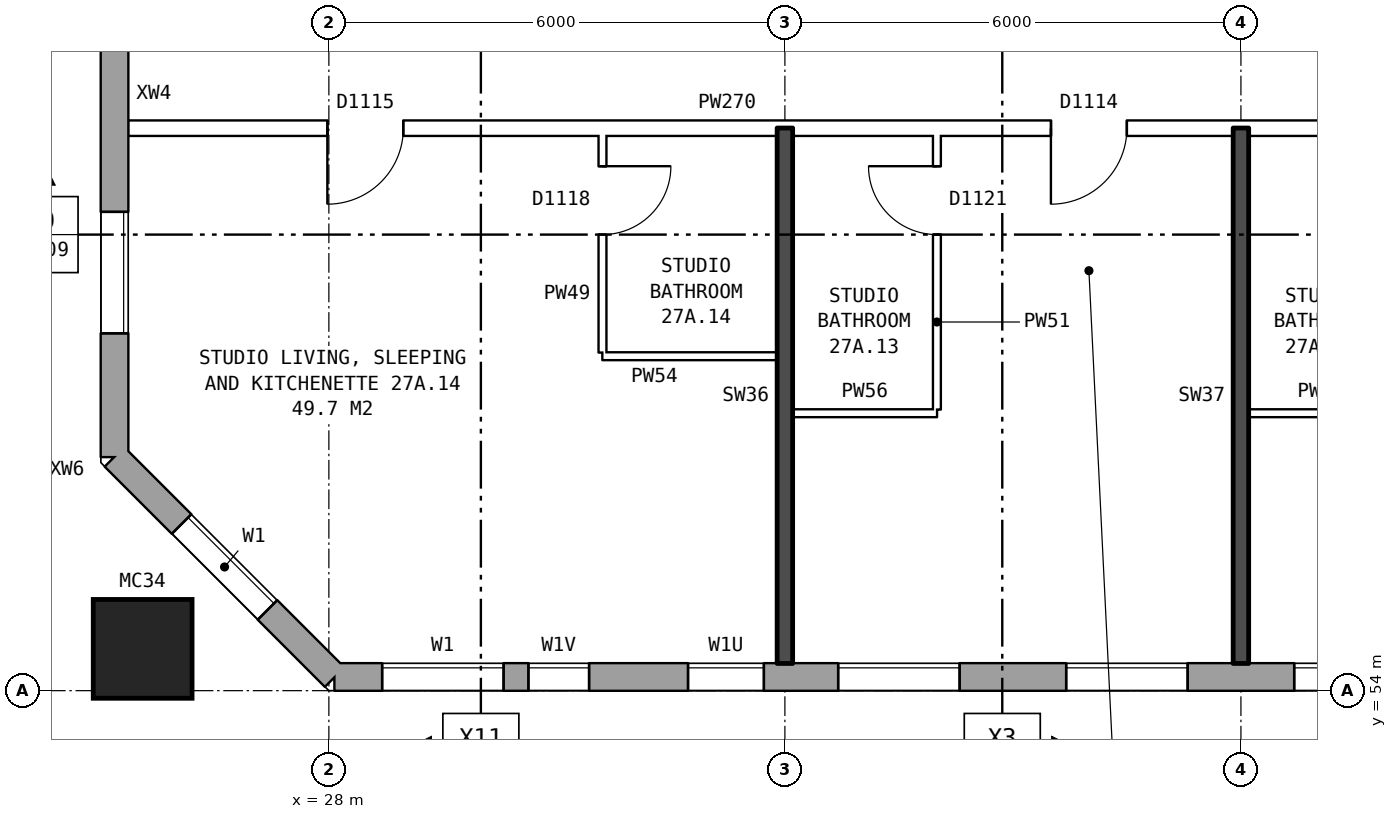
"""IFC4 building model, lengths in metres.
Left out: names, types, materials, properties, quantities, classifications, styles, units other than length and angle.
Written with IfcOpenShell. Run it as: python <this file> out.ifc"""

import sys

from ifc_helpers import new_model, si_unit, direction, frame, frame_2d, origin, origin_2d, place, context, subcontext, project, spatial, rectangle, hollow_rectangle, extrude, element, fill, save


model = new_model("IFC4")
c1 = context("Model", 3, precision=1e-05, world=origin(), true_north=direction((0.0, 1.0)))
c2 = subcontext(c1, "Body", "Model", "MODEL_VIEW")
j1 = project(units=[si_unit("LENGTHUNIT", "METRE"), si_unit("PLANEANGLEUNIT", "RADIAN")], contexts=[c1])
p1 = place(None, origin())
s1 = spatial("IfcSite", under=j1, at=p1, CompositionType="ELEMENT")
p2 = place(p1, origin())
s2 = spatial("IfcBuilding", under=s1, at=p2, CompositionType="ELEMENT")
p3 = place(p2, frame((0.0, 0.0, 99.5)))
s3 = spatial("IfcBuildingStorey", under=s2, at=p3, CompositionType="ELEMENT", Elevation=99.5)
p4 = place(p3, frame((25.55, 54.55, 0.0), z_axis=(0.0, 0.0, 1.0), x_axis=(1.0, 0.0, 0.0)))
e1 = element("IfcColumn", 1, at=p4, inside=s3, PredefinedType="COLUMN", context=c2, shape_type="SweptSolid", body=[
    extrude(hollow_rectangle(XDim=1.3, YDim=1.3, WallThickness=0.07, at=origin_2d()), origin(), (0.0, 0.0, 1.0), 3.1),
])
p5 = place(p3, frame((25.18, 57.075, 0.0), z_axis=(0.0, 0.0, 1.0), x_axis=(0.707106781187, -0.707106781187, 0.0)))
e2 = element("IfcWall", 2, at=p5, inside=s3, PredefinedType="STANDARD", context=c2, shape_type="SweptSolid", body=[
    extrude(rectangle(XDim=4.094, YDim=0.36, at=frame_2d((2.047, 0.0))), origin(), (0.0, 0.0, 1.0), 2.85),
])
p6 = place(p5, frame((1.247, 0.0, 0.8)))
e3 = element("IfcOpeningElement", 3, at=p6, cuts=e2, PredefinedType="OPENING", context=c2, shape_type="SweptSolid", body=[
    extrude(rectangle(XDim=1.6, YDim=1.8, at=frame_2d((0.8, 0.9))), frame((0.0, 0.19, 0.0), z_axis=(0.0, -1.0, 0.0), x_axis=(1.0, 0.0, 0.0)), (0.0, 0.0, 1.0), 0.38),
])
p7 = place(p3, frame((28.075, 54.18, 0.0), z_axis=(0.0, 0.0, 1.0), x_axis=(1.0, 0.0, 0.0)))
e4 = element("IfcWall", 4, at=p7, inside=s3, PredefinedType="STANDARD", context=c2, shape_type="SweptSolid", body=[
    extrude(rectangle(XDim=44.851, YDim=0.36, at=frame_2d((22.425, 0.0))), origin(), (0.0, 0.0, 1.0), 2.85),
])
p8 = place(p7, frame((0.625, 0.0, 0.8)))
e5 = element("IfcOpeningElement", 5, at=p8, cuts=e4, PredefinedType="OPENING", context=c2, shape_type="SweptSolid", body=[
    extrude(rectangle(XDim=1.6, YDim=1.8, at=frame_2d((0.8, 0.9))), frame((0.0, 0.19, 0.0), z_axis=(0.0, -1.0, 0.0), x_axis=(1.0, 0.0, 0.0)), (0.0, 0.0, 1.0), 0.38),
])
p9 = place(p7, frame((2.55, 0.0, 1.7)))
e6 = element("IfcOpeningElement", 6, at=p9, cuts=e4, PredefinedType="OPENING", context=c2, shape_type="SweptSolid", body=[
    extrude(rectangle(XDim=0.8, YDim=0.9, at=frame_2d((0.4, 0.45))), frame((0.0, 0.19, 0.0), z_axis=(0.0, -1.0, 0.0), x_axis=(1.0, 0.0, 0.0)), (0.0, 0.0, 1.0), 0.38),
])
p10 = place(p7, frame((6.625, 0.0, 0.8)))
e7 = element("IfcOpeningElement", 7, at=p10, cuts=e4, PredefinedType="OPENING", context=c2, shape_type="SweptSolid", body=[
    extrude(rectangle(XDim=1.6, YDim=1.8, at=frame_2d((0.8, 0.9))), frame((0.0, 0.19, 0.0), z_axis=(0.0, -1.0, 0.0), x_axis=(1.0, 0.0, 0.0)), (0.0, 0.0, 1.0), 0.38),
])
p11 = place(p7, frame((9.625, 0.0, 0.8)))
e8 = element("IfcOpeningElement", 8, at=p11, cuts=e4, PredefinedType="OPENING", context=c2, shape_type="SweptSolid", body=[
    extrude(rectangle(XDim=1.6, YDim=1.8, at=frame_2d((0.8, 0.9))), frame((0.0, 0.19, 0.0), z_axis=(0.0, -1.0, 0.0), x_axis=(1.0, 0.0, 0.0)), (0.0, 0.0, 1.0), 0.38),
])
p12 = place(p7, frame((12.625, 0.0, 0.8)))
e9 = element("IfcOpeningElement", 9, at=p12, cuts=e4, PredefinedType="OPENING", context=c2, shape_type="SweptSolid", body=[
    extrude(rectangle(XDim=1.6, YDim=1.8, at=frame_2d((0.8, 0.9))), frame((0.0, 0.19, 0.0), z_axis=(0.0, -1.0, 0.0), x_axis=(1.0, 0.0, 0.0)), (0.0, 0.0, 1.0), 0.38),
])
p13 = place(p7, frame((15.625, 0.0, 0.8)))
e10 = element("IfcOpeningElement", 10, at=p13, cuts=e4, PredefinedType="OPENING", context=c2, shape_type="SweptSolid", body=[
    extrude(rectangle(XDim=1.6, YDim=1.8, at=frame_2d((0.8, 0.9))), frame((0.0, 0.19, 0.0), z_axis=(0.0, -1.0, 0.0), x_axis=(1.0, 0.0, 0.0)), (0.0, 0.0, 1.0), 0.38),
])
p14 = place(p7, frame((18.625, 0.0, 0.8)))
e11 = element("IfcOpeningElement", 11, at=p14, cuts=e4, PredefinedType="OPENING", context=c2, shape_type="SweptSolid", body=[
    extrude(rectangle(XDim=1.6, YDim=1.8, at=frame_2d((0.8, 0.9))), frame((0.0, 0.19, 0.0), z_axis=(0.0, -1.0, 0.0), x_axis=(1.0, 0.0, 0.0)), (0.0, 0.0, 1.0), 0.38),
])
p15 = place(p7, frame((21.625, 0.0, 0.8)))
e12 = element("IfcOpeningElement", 12, at=p15, cuts=e4, PredefinedType="OPENING", context=c2, shape_type="SweptSolid", body=[
    extrude(rectangle(XDim=1.6, YDim=1.8, at=frame_2d((0.8, 0.9))), frame((0.0, 0.19, 0.0), z_axis=(0.0, -1.0, 0.0), x_axis=(1.0, 0.0, 0.0)), (0.0, 0.0, 1.0), 0.38),
])
p16 = place(p7, frame((24.625, 0.0, 0.8)))
e13 = element("IfcOpeningElement", 13, at=p16, cuts=e4, PredefinedType="OPENING", context=c2, shape_type="SweptSolid", body=[
    extrude(rectangle(XDim=1.6, YDim=1.8, at=frame_2d((0.8, 0.9))), frame((0.0, 0.19, 0.0), z_axis=(0.0, -1.0, 0.0), x_axis=(1.0, 0.0, 0.0)), (0.0, 0.0, 1.0), 0.38),
])
p17 = place(p7, frame((27.625, 0.0, 0.8)))
e14 = element("IfcOpeningElement", 14, at=p17, cuts=e4, PredefinedType="OPENING", context=c2, shape_type="SweptSolid", body=[
    extrude(rectangle(XDim=1.6, YDim=1.8, at=frame_2d((0.8, 0.9))), frame((0.0, 0.19, 0.0), z_axis=(0.0, -1.0, 0.0), x_axis=(1.0, 0.0, 0.0)), (0.0, 0.0, 1.0), 0.38),
])
p18 = place(p7, frame((30.625, 0.0, 0.8)))
e15 = element("IfcOpeningElement", 15, at=p18, cuts=e4, PredefinedType="OPENING", context=c2, shape_type="SweptSolid", body=[
    extrude(rectangle(XDim=1.6, YDim=1.8, at=frame_2d((0.8, 0.9))), frame((0.0, 0.19, 0.0), z_axis=(0.0, -1.0, 0.0), x_axis=(1.0, 0.0, 0.0)), (0.0, 0.0, 1.0), 0.38),
])
p19 = place(p7, frame((33.625, 0.0, 0.8)))
e16 = element("IfcOpeningElement", 16, at=p19, cuts=e4, PredefinedType="OPENING", context=c2, shape_type="SweptSolid", body=[
    extrude(rectangle(XDim=1.6, YDim=1.8, at=frame_2d((0.8, 0.9))), frame((0.0, 0.19, 0.0), z_axis=(0.0, -1.0, 0.0), x_axis=(1.0, 0.0, 0.0)), (0.0, 0.0, 1.0), 0.38),
])
p20 = place(p7, frame((36.625, 0.0, 0.8)))
e17 = element("IfcOpeningElement", 17, at=p20, cuts=e4, PredefinedType="OPENING", context=c2, shape_type="SweptSolid", body=[
    extrude(rectangle(XDim=1.6, YDim=1.8, at=frame_2d((0.8, 0.9))), frame((0.0, 0.19, 0.0), z_axis=(0.0, -1.0, 0.0), x_axis=(1.0, 0.0, 0.0)), (0.0, 0.0, 1.0), 0.38),
])
p21 = place(p7, frame((38.525, 0.0, 0.8)))
e18 = element("IfcOpeningElement", 18, at=p21, cuts=e4, PredefinedType="OPENING", context=c2, shape_type="SweptSolid", body=[
    extrude(rectangle(XDim=1.2, YDim=1.2, at=frame_2d((0.6, 0.6))), frame((0.0, 0.19, 0.0), z_axis=(0.0, -1.0, 0.0), x_axis=(1.0, 0.0, 0.0)), (0.0, 0.0, 1.0), 0.38),
])
p22 = place(p7, frame((42.625, 0.0, 0.8)))
e19 = element("IfcOpeningElement", 19, at=p22, cuts=e4, PredefinedType="OPENING", context=c2, shape_type="SweptSolid", body=[
    extrude(rectangle(XDim=1.6, YDim=1.8, at=frame_2d((0.8, 0.9))), frame((0.0, 0.19, 0.0), z_axis=(0.0, -1.0, 0.0), x_axis=(1.0, 0.0, 0.0)), (0.0, 0.0, 1.0), 0.38),
])
p23 = place(p7, frame((4.65, 0.0, 0.8)))
e20 = element("IfcOpeningElement", 20, at=p23, cuts=e4, PredefinedType="OPENING", context=c2, shape_type="SweptSolid", body=[
    extrude(rectangle(XDim=1.0, YDim=0.9, at=frame_2d((0.5, 0.45))), frame((0.0, 0.19, 0.0), z_axis=(0.0, -1.0, 0.0), x_axis=(1.0, 0.0, 0.0)), (0.0, 0.0, 1.0), 0.38),
])
p24 = place(p3, frame((25.18, 82.925, 0.0), z_axis=(0.0, 0.0, 1.0), x_axis=(0.0, -1.0, 0.0)))
e21 = element("IfcWall", 21, at=p24, inside=s3, PredefinedType="STANDARD", context=c2, shape_type="SweptSolid", body=[
    extrude(rectangle(XDim=25.851, YDim=0.36, at=frame_2d((12.925, 0.0))), origin(), (0.0, 0.0, 1.0), 2.85),
])
p25 = place(p24, frame((1.625, 0.0, 0.8)))
e22 = element("IfcOpeningElement", 22, at=p25, cuts=e21, PredefinedType="OPENING", context=c2, shape_type="SweptSolid", body=[
    extrude(rectangle(XDim=1.6, YDim=1.8, at=frame_2d((0.8, 0.9))), frame((0.0, 0.19, 0.0), z_axis=(0.0, -1.0, 0.0), x_axis=(1.0, 0.0, 0.0)), (0.0, 0.0, 1.0), 0.38),
])
p26 = place(p24, frame((6.175, 0.0, 0.8)))
e23 = element("IfcOpeningElement", 23, at=p26, cuts=e21, PredefinedType="OPENING", context=c2, shape_type="SweptSolid", body=[
    extrude(rectangle(XDim=1.0, YDim=0.9, at=frame_2d((0.5, 0.45))), frame((0.0, 0.19, 0.0), z_axis=(0.0, -1.0, 0.0), x_axis=(1.0, 0.0, 0.0)), (0.0, 0.0, 1.0), 0.38),
])
p27 = place(p24, frame((7.625, 0.0, 0.8)))
e24 = element("IfcOpeningElement", 24, at=p27, cuts=e21, PredefinedType="OPENING", context=c2, shape_type="SweptSolid", body=[
    extrude(rectangle(XDim=1.6, YDim=1.8, at=frame_2d((0.8, 0.9))), frame((0.0, 0.19, 0.0), z_axis=(0.0, -1.0, 0.0), x_axis=(1.0, 0.0, 0.0)), (0.0, 0.0, 1.0), 0.38),
])
p28 = place(p24, frame((10.625, 0.0, 0.8)))
e25 = element("IfcOpeningElement", 25, at=p28, cuts=e21, PredefinedType="OPENING", context=c2, shape_type="SweptSolid", body=[
    extrude(rectangle(XDim=1.6, YDim=1.8, at=frame_2d((0.8, 0.9))), frame((0.0, 0.19, 0.0), z_axis=(0.0, -1.0, 0.0), x_axis=(1.0, 0.0, 0.0)), (0.0, 0.0, 1.0), 0.38),
])
p29 = place(p24, frame((13.625, 0.0, 0.8)))
e26 = element("IfcOpeningElement", 26, at=p29, cuts=e21, PredefinedType="OPENING", context=c2, shape_type="SweptSolid", body=[
    extrude(rectangle(XDim=1.6, YDim=1.8, at=frame_2d((0.8, 0.9))), frame((0.0, 0.19, 0.0), z_axis=(0.0, -1.0, 0.0), x_axis=(1.0, 0.0, 0.0)), (0.0, 0.0, 1.0), 0.38),
])
p30 = place(p24, frame((16.625, 0.0, 0.8)))
e27 = element("IfcOpeningElement", 27, at=p30, cuts=e21, PredefinedType="OPENING", context=c2, shape_type="SweptSolid", body=[
    extrude(rectangle(XDim=1.6, YDim=1.8, at=frame_2d((0.8, 0.9))), frame((0.0, 0.19, 0.0), z_axis=(0.0, -1.0, 0.0), x_axis=(1.0, 0.0, 0.0)), (0.0, 0.0, 1.0), 0.38),
])
p31 = place(p24, frame((9.525, 0.0, 0.8)))
e28 = element("IfcOpeningElement", 28, at=p31, cuts=e21, PredefinedType="OPENING", context=c2, shape_type="SweptSolid", body=[
    extrude(rectangle(XDim=0.8, YDim=1.8, at=frame_2d((0.4, 0.9))), frame((0.0, 0.19, 0.0), z_axis=(0.0, -1.0, 0.0), x_axis=(1.0, 0.0, 0.0)), (0.0, 0.0, 1.0), 0.38),
])
p32 = place(p24, frame((22.625, 0.0, 0.8)))
e29 = element("IfcOpeningElement", 29, at=p32, cuts=e21, PredefinedType="OPENING", context=c2, shape_type="SweptSolid", body=[
    extrude(rectangle(XDim=1.6, YDim=1.8, at=frame_2d((0.8, 0.9))), frame((0.0, 0.19, 0.0), z_axis=(0.0, -1.0, 0.0), x_axis=(1.0, 0.0, 0.0)), (0.0, 0.0, 1.0), 0.38),
])
p33 = place(p24, frame((12.525, 0.0, 0.8)))
e30 = element("IfcOpeningElement", 30, at=p33, cuts=e21, PredefinedType="OPENING", context=c2, shape_type="SweptSolid", body=[
    extrude(rectangle(XDim=0.8, YDim=1.8, at=frame_2d((0.4, 0.9))), frame((0.0, 0.19, 0.0), z_axis=(0.0, -1.0, 0.0), x_axis=(1.0, 0.0, 0.0)), (0.0, 0.0, 1.0), 0.38),
])
p34 = place(p24, frame((15.525, 0.0, 0.8)))
e31 = element("IfcOpeningElement", 31, at=p34, cuts=e21, PredefinedType="OPENING", context=c2, shape_type="SweptSolid", body=[
    extrude(rectangle(XDim=0.8, YDim=1.8, at=frame_2d((0.4, 0.9))), frame((0.0, 0.19, 0.0), z_axis=(0.0, -1.0, 0.0), x_axis=(1.0, 0.0, 0.0)), (0.0, 0.0, 1.0), 0.38),
])
p35 = place(p24, frame((18.525, 0.0, 0.8)))
e32 = element("IfcOpeningElement", 32, at=p35, cuts=e21, PredefinedType="OPENING", context=c2, shape_type="SweptSolid", body=[
    extrude(rectangle(XDim=1.0, YDim=0.9, at=frame_2d((0.5, 0.45))), frame((0.0, 0.19, 0.0), z_axis=(0.0, -1.0, 0.0), x_axis=(1.0, 0.0, 0.0)), (0.0, 0.0, 1.0), 0.38),
])
for number, where, z_axis, x_axis in (
    (33, (34.1, 57.65, 0.0), (0.0, 0.0, 1.0), (1.0, 0.0, 0.0)),
    (34, (40.1, 57.65, 0.0), (0.0, 0.0, 1.0), (1.0, 0.0, 0.0)),
):
    element("IfcWall", number, at=place(p3, frame(where, z_axis=z_axis, x_axis=x_axis)), inside=s3, PredefinedType="PARTITIONING", context=c2, shape_type="SweptSolid", body=[
        extrude(rectangle(XDim=1.9, YDim=0.1, at=frame_2d((0.95, 0.0))), origin(), (0.0, 0.0, 1.0), 2.85),
    ])
p36 = place(p3, frame((31.6, 58.4, 0.0), z_axis=(0.0, 0.0, 1.0), x_axis=(1.0, 0.0, 0.0)))
e35 = element("IfcWall", 35, at=p36, inside=s3, PredefinedType="PARTITIONING", context=c2, shape_type="SweptSolid", body=[
    extrude(rectangle(XDim=2.3, YDim=0.1, at=frame_2d((1.15, 0.0))), origin(), (0.0, 0.0, 1.0), 2.85),
])
p37 = place(p3, frame((25.36, 61.4, 0.0), z_axis=(0.0, 0.0, 1.0), x_axis=(1.0, 0.0, 0.0)))
e36 = element("IfcWall", 36, at=p37, inside=s3, PredefinedType="PARTITIONING", context=c2, shape_type="SweptSolid", body=[
    extrude(rectangle(XDim=20.54, YDim=0.2, at=frame_2d((10.27, 0.0))), origin(), (0.0, 0.0, 1.0), 2.85),
])
p38 = place(p37, frame((18.09, 0.0, 0.0)))
e37 = element("IfcOpeningElement", 37, at=p38, cuts=e36, PredefinedType="OPENING", context=c2, shape_type="SweptSolid", body=[
    extrude(rectangle(XDim=1.0, YDim=2.1, at=frame_2d((0.5, 1.05))), frame((0.0, 0.11, 0.0), z_axis=(0.0, -1.0, 0.0), x_axis=(1.0, 0.0, 0.0)), (0.0, 0.0, 1.0), 0.22),
])
p39 = place(p37, frame((12.14, 0.0, 0.0)))
e38 = element("IfcOpeningElement", 38, at=p39, cuts=e36, PredefinedType="OPENING", context=c2, shape_type="SweptSolid", body=[
    extrude(rectangle(XDim=1.0, YDim=2.1, at=frame_2d((0.5, 1.05))), frame((0.0, 0.11, 0.0), z_axis=(0.0, -1.0, 0.0), x_axis=(1.0, 0.0, 0.0)), (0.0, 0.0, 1.0), 0.22),
])
p40 = place(p37, frame((2.62, 0.0, 0.0)))
e39 = element("IfcOpeningElement", 39, at=p40, cuts=e36, PredefinedType="OPENING", context=c2, shape_type="SweptSolid", body=[
    extrude(rectangle(XDim=1.0, YDim=2.1, at=frame_2d((0.5, 1.05))), frame((0.0, 0.11, 0.0), z_axis=(0.0, -1.0, 0.0), x_axis=(1.0, 0.0, 0.0)), (0.0, 0.0, 1.0), 0.22),
])
p41 = place(p3, frame((31.6, 58.45, 0.0), z_axis=(0.0, 0.0, 1.0), x_axis=(0.0, 1.0, 0.0)))
e40 = element("IfcWall", 40, at=p41, inside=s3, PredefinedType="PARTITIONING", context=c2, shape_type="SweptSolid", body=[
    extrude(rectangle(XDim=2.85, YDim=0.1, at=frame_2d((1.425, 0.0))), origin(), (0.0, 0.0, 1.0), 2.85),
])
p42 = place(p41, frame((1.55, 0.0, 0.0)))
e41 = element("IfcOpeningElement", 41, at=p42, cuts=e40, PredefinedType="OPENING", context=c2, shape_type="SweptSolid", body=[
    extrude(rectangle(XDim=0.9, YDim=2.1, at=frame_2d((0.45, 1.05))), frame((0.0, 0.06, 0.0), z_axis=(0.0, -1.0, 0.0), x_axis=(1.0, 0.0, 0.0)), (0.0, 0.0, 1.0), 0.12),
])
p43 = place(p3, frame((34.0, 54.36, 0.0), z_axis=(0.0, 0.0, 1.0), x_axis=(0.0, 1.0, 0.0)))
e42 = element("IfcWall", 42, at=p43, inside=s3, PredefinedType="SOLIDWALL", context=c2, shape_type="SweptSolid", body=[
    extrude(rectangle(XDim=7.04, YDim=0.2, at=frame_2d((3.52, 0.0))), origin(), (0.0, 0.0, 1.0), 2.85),
])
p44 = place(p3, frame((36.0, 57.7, 0.0), z_axis=(0.0, 0.0, 1.0), x_axis=(0.0, 1.0, 0.0)))
e43 = element("IfcWall", 43, at=p44, inside=s3, PredefinedType="PARTITIONING", context=c2, shape_type="SweptSolid", body=[
    extrude(rectangle(XDim=3.6, YDim=0.1, at=frame_2d((1.8, 0.0))), origin(), (0.0, 0.0, 1.0), 2.85),
])
p45 = place(p44, frame((2.3, 0.0, 0.0)))
e44 = element("IfcOpeningElement", 44, at=p45, cuts=e43, PredefinedType="OPENING", context=c2, shape_type="SweptSolid", body=[
    extrude(rectangle(XDim=0.9, YDim=2.1, at=frame_2d((0.45, 1.05))), frame((0.0, 0.06, 0.0), z_axis=(0.0, -1.0, 0.0), x_axis=(1.0, 0.0, 0.0)), (0.0, 0.0, 1.0), 0.12),
])
p46 = place(p3, frame((40.0, 54.36, 0.0), z_axis=(0.0, 0.0, 1.0), x_axis=(0.0, 1.0, 0.0)))
e45 = element("IfcWall", 45, at=p46, inside=s3, PredefinedType="SOLIDWALL", context=c2, shape_type="SweptSolid", body=[
    extrude(rectangle(XDim=7.04, YDim=0.2, at=frame_2d((3.52, 0.0))), origin(), (0.0, 0.0, 1.0), 2.85),
])
p47 = place(p6, origin())
e46 = element("IfcWindow", 46, at=p47, inside=s3, PartitioningType="SINGLE_PANEL", PredefinedType="WINDOW", context=c2, shape_type="SweptSolid", body=[
    extrude(rectangle(XDim=1.6, YDim=1.8, at=frame_2d((0.8, 0.9))), frame((0.0, 0.15, 0.0), z_axis=(0.0, -1.0, 0.0), x_axis=(1.0, 0.0, 0.0)), (0.0, 0.0, 1.0), 0.06),
])
fill(e3, e46)
p48 = place(p8, origin())
e47 = element("IfcWindow", 47, at=p48, inside=s3, PartitioningType="SINGLE_PANEL", PredefinedType="WINDOW", context=c2, shape_type="SweptSolid", body=[
    extrude(rectangle(XDim=1.6, YDim=1.8, at=frame_2d((0.8, 0.9))), frame((0.0, 0.15, 0.0), z_axis=(0.0, -1.0, 0.0), x_axis=(1.0, 0.0, 0.0)), (0.0, 0.0, 1.0), 0.06),
])
fill(e5, e47)
p49 = place(p9, origin())
e48 = element("IfcWindow", 48, at=p49, inside=s3, PartitioningType="SINGLE_PANEL", PredefinedType="WINDOW", context=c2, shape_type="SweptSolid", body=[
    extrude(rectangle(XDim=0.8, YDim=0.9, at=frame_2d((0.4, 0.45))), frame((0.0, 0.15, 0.0), z_axis=(0.0, -1.0, 0.0), x_axis=(1.0, 0.0, 0.0)), (0.0, 0.0, 1.0), 0.06),
])
fill(e6, e48)
p50 = place(p10, origin())
e49 = element("IfcWindow", 49, at=p50, inside=s3, PartitioningType="SINGLE_PANEL", PredefinedType="WINDOW", context=c2, shape_type="SweptSolid", body=[
    extrude(rectangle(XDim=1.6, YDim=1.8, at=frame_2d((0.8, 0.9))), frame((0.0, 0.15, 0.0), z_axis=(0.0, -1.0, 0.0), x_axis=(1.0, 0.0, 0.0)), (0.0, 0.0, 1.0), 0.06),
])
fill(e7, e49)
p51 = place(p11, origin())
e50 = element("IfcWindow", 50, at=p51, inside=s3, PartitioningType="SINGLE_PANEL", PredefinedType="WINDOW", context=c2, shape_type="SweptSolid", body=[
    extrude(rectangle(XDim=1.6, YDim=1.8, at=frame_2d((0.8, 0.9))), frame((0.0, 0.15, 0.0), z_axis=(0.0, -1.0, 0.0), x_axis=(1.0, 0.0, 0.0)), (0.0, 0.0, 1.0), 0.06),
])
fill(e8, e50)
p52 = place(p12, origin())
e51 = element("IfcWindow", 51, at=p52, inside=s3, PartitioningType="SINGLE_PANEL", PredefinedType="WINDOW", context=c2, shape_type="SweptSolid", body=[
    extrude(rectangle(XDim=1.6, YDim=1.8, at=frame_2d((0.8, 0.9))), frame((0.0, 0.15, 0.0), z_axis=(0.0, -1.0, 0.0), x_axis=(1.0, 0.0, 0.0)), (0.0, 0.0, 1.0), 0.06),
])
fill(e9, e51)
p53 = place(p32, origin())
e52 = element("IfcWindow", 52, at=p53, inside=s3, PartitioningType="SINGLE_PANEL", PredefinedType="WINDOW", context=c2, shape_type="SweptSolid", body=[
    extrude(rectangle(XDim=1.6, YDim=1.8, at=frame_2d((0.8, 0.9))), frame((0.0, 0.15, 0.0), z_axis=(0.0, -1.0, 0.0), x_axis=(1.0, 0.0, 0.0)), (0.0, 0.0, 1.0), 0.06),
])
fill(e29, e52)
p54 = place(p39, frame((1.0, 0.0, 0.0), z_axis=(0.0, 0.0, 1.0), x_axis=(-1.0, 0.0, 0.0)))
e53 = element("IfcDoor", 53, at=p54, inside=s3, OperationType="SINGLE_SWING_RIGHT", PredefinedType="DOOR", context=c2, shape_type="SweptSolid", body=[
    extrude(rectangle(XDim=1.0, YDim=2.1, at=frame_2d((0.5, 1.05))), frame((0.0, 0.025, 0.0), z_axis=(0.0, -1.0, 0.0), x_axis=(1.0, 0.0, 0.0)), (0.0, 0.0, 1.0), 0.05),
])
fill(e38, e53)
p55 = place(p45, origin())
e54 = element("IfcDoor", 54, at=p55, inside=s3, OperationType="SINGLE_SWING_RIGHT", PredefinedType="DOOR", context=c2, shape_type="SweptSolid", body=[
    extrude(rectangle(XDim=0.9, YDim=2.1, at=frame_2d((0.45, 1.05))), frame((0.0, 0.025, 0.0), z_axis=(0.0, -1.0, 0.0), x_axis=(1.0, 0.0, 0.0)), (0.0, 0.0, 1.0), 0.05),
])
fill(e44, e54)
p56 = place(p40, frame((1.0, 0.0, 0.0), z_axis=(0.0, 0.0, 1.0), x_axis=(-1.0, 0.0, 0.0)))
e55 = element("IfcDoor", 55, at=p56, inside=s3, OperationType="SINGLE_SWING_RIGHT", PredefinedType="DOOR", context=c2, shape_type="SweptSolid", body=[
    extrude(rectangle(XDim=1.0, YDim=2.1, at=frame_2d((0.5, 1.05))), frame((0.0, 0.025, 0.0), z_axis=(0.0, -1.0, 0.0), x_axis=(1.0, 0.0, 0.0)), (0.0, 0.0, 1.0), 0.05),
])
fill(e39, e55)
p57 = place(p42, frame((0.9, 0.0, 0.0), z_axis=(0.0, 0.0, 1.0), x_axis=(-1.0, 0.0, 0.0)))
e56 = element("IfcDoor", 56, at=p57, inside=s3, OperationType="SINGLE_SWING_LEFT", PredefinedType="DOOR", context=c2, shape_type="SweptSolid", body=[
    extrude(rectangle(XDim=0.9, YDim=2.1, at=frame_2d((0.45, 1.05))), frame((0.0, 0.025, 0.0), z_axis=(0.0, -1.0, 0.0), x_axis=(1.0, 0.0, 0.0)), (0.0, 0.0, 1.0), 0.05),
])
fill(e41, e56)
p58 = place(p23, origin())
e57 = element("IfcWindow", 57, at=p58, inside=s3, PartitioningType="SINGLE_PANEL", PredefinedType="WINDOW", context=c2, shape_type="SweptSolid", body=[
    extrude(rectangle(XDim=1.0, YDim=0.9, at=frame_2d((0.5, 0.45))), frame((0.0, 0.15, 0.0), z_axis=(0.0, -1.0, 0.0), x_axis=(1.0, 0.0, 0.0)), (0.0, 0.0, 1.0), 0.06),
])
fill(e20, e57)
save(model, sys.argv[1])
